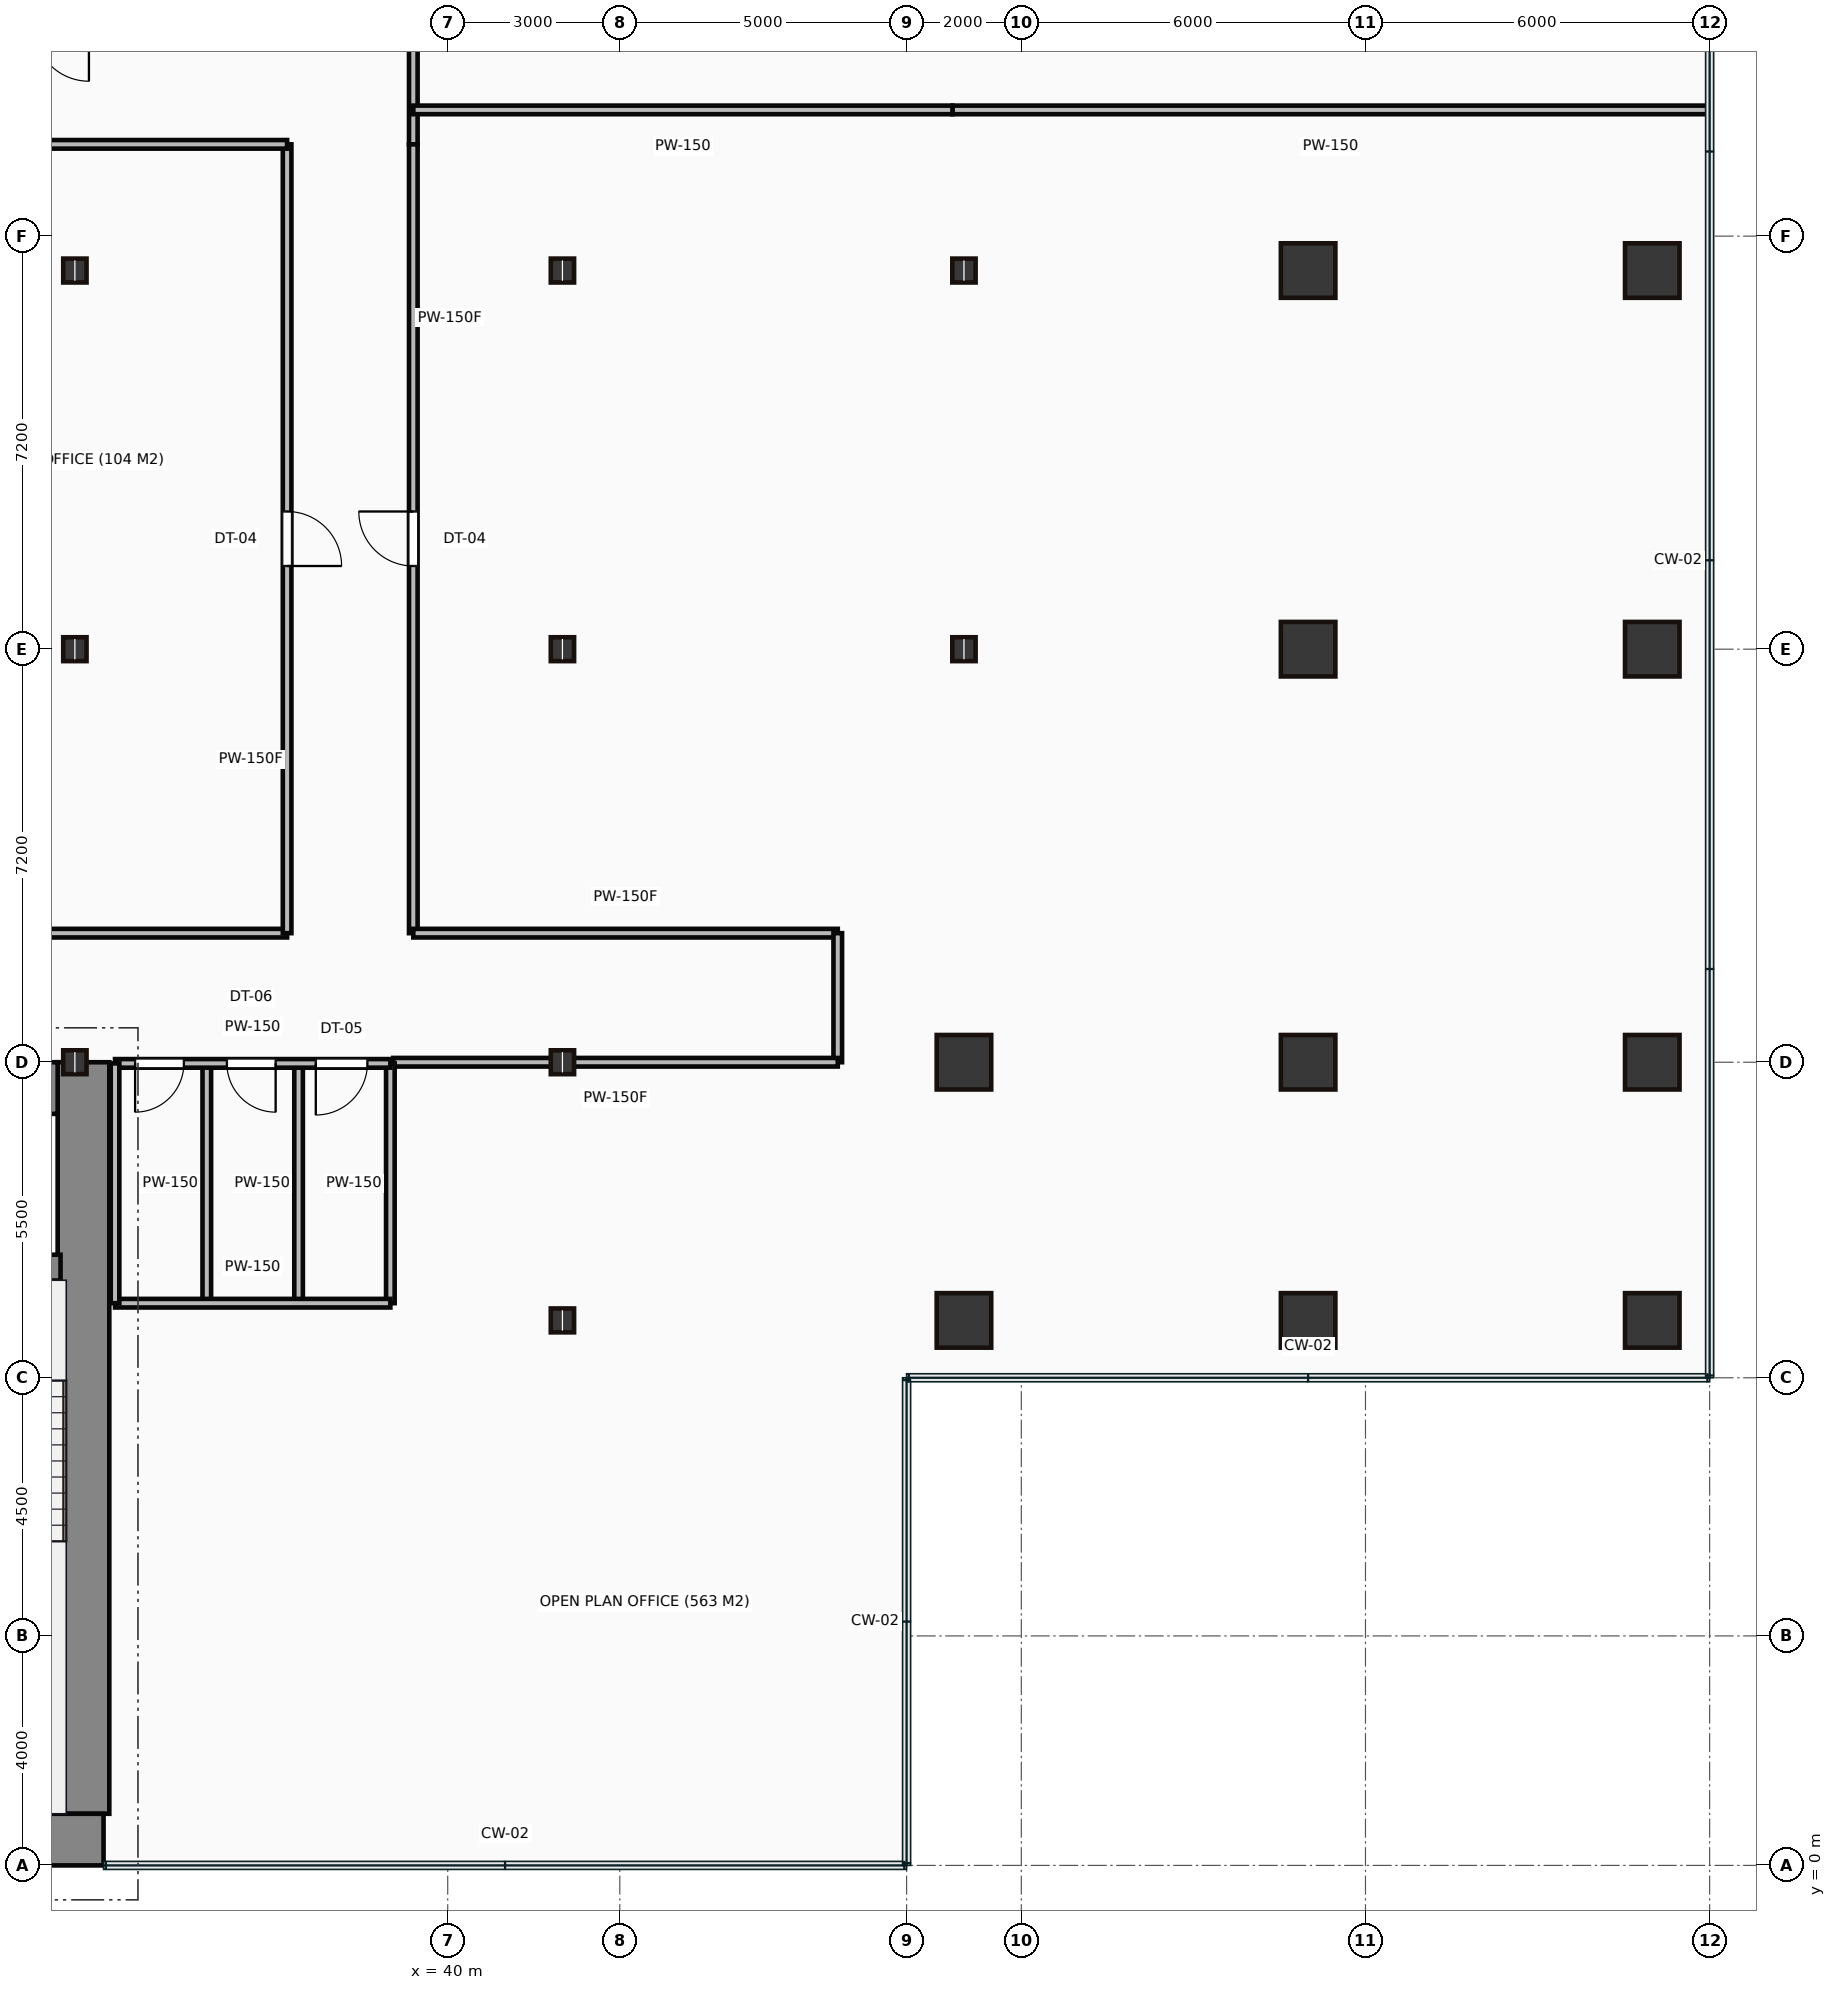
"""IFC4 building model, lengths in metres.
Left out: names, types, materials, properties, quantities, classifications, styles, units other than length and angle.
Written with IfcOpenShell. Run it as: python <this file> out.ifc"""

import sys

from ifc_helpers import new_model, si_unit, direction, frame, frame_2d, origin, origin_2d, place, context, subcontext, project, spatial, rectangle, hollow_rectangle, i_section, extrude, source, transform, mapped, element, fill, save


model = new_model("IFC4")
c1 = context("Model", 3, precision=1e-05, world=origin(), true_north=direction((0.0, 1.0)))
c2 = subcontext(c1, "Body", "Model", "MODEL_VIEW")
j1 = project(units=[si_unit("LENGTHUNIT", "METRE"), si_unit("PLANEANGLEUNIT", "RADIAN")], contexts=[c1])
p1 = place(None, origin())
s1 = spatial("IfcSite", under=j1, at=p1, CompositionType="ELEMENT")
p2 = place(p1, origin())
s2 = spatial("IfcBuilding", under=s1, at=p2, CompositionType="ELEMENT")
p3 = place(p2, frame((0.0, 0.0, 65.35)))
s3 = spatial("IfcBuildingStorey", under=s2, at=p3, CompositionType="ELEMENT", Elevation=65.35)
m1 = source(origin(), c2, "Body", "SweptSolid", [
    extrude(rectangle(XDim=29.5, YDim=0.9, at=frame_2d((14.75, 0.0))), origin(), (0.0, 0.0, 1.0), 3.65),
])
p4 = place(p3, frame((4.5, 0.45, 0.0), z_axis=(0.0, 0.0, 1.0), x_axis=(1.0, 0.0, 0.0)))
e1 = element("IfcWall", 1, at=p4, inside=s3, PredefinedType="SHEAR", context=c2, shape_type="MappedRepresentation", body=[
    mapped(m1, transform((0.0, 0.0, 0.0))),
])
m2 = source(origin(), c2, "Body", "SweptSolid", [
    extrude(rectangle(XDim=13.1, YDim=0.9, at=frame_2d((6.55, 0.0))), origin(), (0.0, 0.0, 1.0), 3.65),
])
p5 = place(p3, frame((33.65, 0.9, 0.0), z_axis=(0.0, 0.0, 1.0), x_axis=(0.0, 1.0, 0.0)))
e2 = element("IfcWall", 2, at=p5, inside=s3, PredefinedType="SHEAR", context=c2, shape_type="MappedRepresentation", body=[
    mapped(m2, transform((0.0, 0.0, 0.0))),
])
m3 = source(origin(), c2, "Body", "SweptSolid", [
    extrude(rectangle(XDim=12.6, YDim=0.9, at=frame_2d((6.3, 0.0))), origin(), (0.0, 0.0, 1.0), 3.65),
])
p6 = place(p3, frame((20.6, 13.55, 0.0), z_axis=(0.0, 0.0, 1.0), x_axis=(1.0, 0.0, 0.0)))
e3 = element("IfcWall", 3, at=p6, inside=s3, PredefinedType="SHEAR", context=c2, shape_type="MappedRepresentation", body=[
    mapped(m3, transform((0.0, 0.0, 0.0))),
])
p7 = place(p6, frame((9.25, 0.0, 0.0)))
e4 = element("IfcOpeningElement", 4, at=p7, cuts=e3, PredefinedType="OPENING", context=c2, shape_type="SweptSolid", body=[
    extrude(rectangle(XDim=1.1, YDim=2.15, at=frame_2d((0.55, 1.075))), frame((0.0, 0.46, 0.0), z_axis=(0.0, -1.0, 0.0), x_axis=(1.0, 0.0, 0.0)), (0.0, 0.0, 1.0), 0.92),
])
m4 = source(origin(), c2, "Body", "SweptSolid", [
    extrude(rectangle(XDim=3.39, YDim=0.45, at=frame_2d((1.695, 0.0))), origin(), (0.0, 0.0, 1.0), 3.65),
])
p8 = place(p3, frame((29.86, 10.42, 0.0), z_axis=(0.0, 0.0, 1.0), x_axis=(1.0, 0.0, 0.0)))
e5 = element("IfcWall", 5, at=p8, inside=s3, PredefinedType="SHEAR", context=c2, shape_type="MappedRepresentation", body=[
    mapped(m4, transform((0.0, 0.0, 0.0))),
])
p9 = place(p8, frame((1.1, 0.0, 0.0)))
e6 = element("IfcOpeningElement", 6, at=p9, cuts=e5, PredefinedType="OPENING", context=c2, shape_type="SweptSolid", body=[
    extrude(rectangle(XDim=1.1, YDim=2.15, at=frame_2d((0.55, 1.075))), frame((0.0, 0.235, 0.0), z_axis=(0.0, -1.0, 0.0), x_axis=(1.0, 0.0, 0.0)), (0.0, 0.0, 1.0), 0.47),
])
m5 = source(origin(), c2, "Body", "SweptSolid", [
    extrude(i_section(OverallWidth=0.406, OverallDepth=0.416, WebThickness=0.03, FlangeThickness=0.048, at=origin_2d()), origin(), (0.0, 0.0, 1.0), 3.65),
])
for number, where, z_axis, x_axis in (
    (7, (33.5, 14.0, 0.0), (0.0, 0.0, 1.0), (1.0, 0.0, 0.0)),
    (8, (33.5, 21.2, 0.0), (0.0, 0.0, 1.0), (1.0, 0.0, 0.0)),
    (9, (33.5, 27.8, 0.0), (0.0, 0.0, 1.0), (1.0, 0.0, 0.0)),
    (10, (42.0, 9.5, 0.0), (0.0, 0.0, 1.0), (1.0, 0.0, 0.0)),
    (11, (42.0, 14.0, 0.0), (0.0, 0.0, 1.0), (1.0, 0.0, 0.0)),
    (12, (42.0, 21.2, 0.0), (0.0, 0.0, 1.0), (1.0, 0.0, 0.0)),
    (13, (42.0, 27.8, 0.0), (0.0, 0.0, 1.0), (1.0, 0.0, 0.0)),
):
    element("IfcColumn", number, at=place(p3, frame(where, z_axis=z_axis, x_axis=x_axis)), inside=s3, PredefinedType="COLUMN", context=c2, shape_type="MappedRepresentation", body=[
        mapped(m5, transform((0.0, 0.0, 0.0))),
    ])
m6 = source(origin(), c2, "Body", "SweptSolid", [
    extrude(hollow_rectangle(XDim=0.95, YDim=0.95, WallThickness=0.045, at=origin_2d()), origin(), (0.0, 0.0, 1.0), 3.65),
])
for number, where, z_axis, x_axis in (
    (14, (49.0, 9.5, 0.0), (0.0, 0.0, 1.0), (1.0, 0.0, 0.0)),
    (15, (49.0, 14.0, 0.0), (0.0, 0.0, 1.0), (1.0, 0.0, 0.0)),
):
    element("IfcColumn", number, at=place(p3, frame(where, z_axis=z_axis, x_axis=x_axis)), inside=s3, PredefinedType="COLUMN", context=c2, shape_type="MappedRepresentation", body=[
        mapped(m6, transform((0.0, 0.0, 0.0))),
    ])
for number, where, z_axis, x_axis in (
    (16, (49.0, 21.2, 0.0), (0.0, 0.0, 1.0), (1.0, 0.0, 0.0)),
    (17, (49.0, 27.8, 0.0), (0.0, 0.0, 1.0), (1.0, 0.0, 0.0)),
):
    element("IfcColumn", number, at=place(p3, frame(where, z_axis=z_axis, x_axis=x_axis)), inside=s3, PredefinedType="COLUMN", context=c2, shape_type="MappedRepresentation", body=[
        mapped(m5, transform((0.0, 0.0, 0.0))),
    ])
for number, where, z_axis, x_axis in (
    (18, (55.0, 9.5, 0.0), (0.0, 0.0, 1.0), (1.0, 0.0, 0.0)),
    (19, (55.0, 14.0, 0.0), (0.0, 0.0, 1.0), (1.0, 0.0, 0.0)),
    (20, (55.0, 21.2, 0.0), (0.0, 0.0, 1.0), (1.0, 0.0, 0.0)),
    (21, (55.0, 27.8, 0.0), (0.0, 0.0, 1.0), (1.0, 0.0, 0.0)),
    (22, (61.0, 9.5, 0.0), (0.0, 0.0, 1.0), (1.0, 0.0, 0.0)),
    (23, (61.0, 14.0, 0.0), (0.0, 0.0, 1.0), (1.0, 0.0, 0.0)),
    (24, (61.0, 21.2, 0.0), (0.0, 0.0, 1.0), (1.0, 0.0, 0.0)),
    (25, (61.0, 27.8, 0.0), (0.0, 0.0, 1.0), (1.0, 0.0, 0.0)),
):
    element("IfcColumn", number, at=place(p3, frame(where, z_axis=z_axis, x_axis=x_axis)), inside=s3, PredefinedType="COLUMN", context=c2, shape_type="MappedRepresentation", body=[
        mapped(m6, transform((0.0, 0.0, 0.0))),
    ])
m7 = source(origin(), c2, "Body", "SweptSolid", [
    extrude(rectangle(XDim=4.8, YDim=0.15, at=frame_2d((2.4, 0.0))), origin(), (0.0, 0.0, 1.0), 2.625),
])
p10 = place(p3, frame((34.2, 13.98, 0.0), z_axis=(0.0, 0.0, 1.0), x_axis=(1.0, 0.0, 0.0)))
e26 = element("IfcWall", 26, at=p10, inside=s3, PredefinedType="PARTITIONING", context=c2, shape_type="MappedRepresentation", body=[
    mapped(m7, transform((0.0, 0.0, 0.0))),
])
p11 = place(p10, frame((0.35, 0.0, 0.0)))
e27 = element("IfcOpeningElement", 27, at=p11, cuts=e26, PredefinedType="OPENING", context=c2, shape_type="SweptSolid", body=[
    extrude(rectangle(XDim=0.85, YDim=2.1, at=frame_2d((0.425, 1.05))), frame((0.0, 0.085, 0.0), z_axis=(0.0, -1.0, 0.0), x_axis=(1.0, 0.0, 0.0)), (0.0, 0.0, 1.0), 0.17),
])
p12 = place(p10, frame((1.95, 0.0, 0.0)))
e28 = element("IfcOpeningElement", 28, at=p12, cuts=e26, PredefinedType="OPENING", context=c2, shape_type="SweptSolid", body=[
    extrude(rectangle(XDim=0.85, YDim=2.1, at=frame_2d((0.425, 1.05))), frame((0.0, 0.085, 0.0), z_axis=(0.0, -1.0, 0.0), x_axis=(1.0, 0.0, 0.0)), (0.0, 0.0, 1.0), 0.17),
])
p13 = place(p10, frame((3.5, 0.0, 0.0)))
e29 = element("IfcOpeningElement", 29, at=p13, cuts=e26, PredefinedType="OPENING", context=c2, shape_type="SweptSolid", body=[
    extrude(rectangle(XDim=0.9, YDim=2.1, at=frame_2d((0.45, 1.05))), frame((0.0, 0.085, 0.0), z_axis=(0.0, -1.0, 0.0), x_axis=(1.0, 0.0, 0.0)), (0.0, 0.0, 1.0), 0.17),
])
m8 = source(origin(), c2, "Body", "SweptSolid", [
    extrude(rectangle(XDim=4.8, YDim=0.15, at=frame_2d((2.4, 0.0))), origin(), (0.0, 0.0, 1.0), 3.4),
])
p14 = place(p3, frame((34.2, 9.8, 0.0), z_axis=(0.0, 0.0, 1.0), x_axis=(1.0, 0.0, 0.0)))
e30 = element("IfcWall", 30, at=p14, inside=s3, PredefinedType="PARTITIONING", context=c2, shape_type="MappedRepresentation", body=[
    mapped(m8, transform((0.0, 0.0, 0.0))),
])
m9 = source(origin(), c2, "Body", "SweptSolid", [
    extrude(rectangle(XDim=4.18, YDim=0.15, at=frame_2d((2.09, 0.0))), origin(), (0.0, 0.0, 1.0), 3.4),
])
for number, where, z_axis, x_axis in (
    (31, (39.0, 9.8, 0.0), (0.0, 0.0, 1.0), (0.0, 1.0, 0.0)),
    (32, (34.2, 9.8, 0.0), (0.0, 0.0, 1.0), (0.0, 1.0, 0.0)),
    (33, (35.8, 9.8, 0.0), (0.0, 0.0, 1.0), (0.0, 1.0, 0.0)),
    (34, (37.4, 9.8, 0.0), (0.0, 0.0, 1.0), (0.0, 1.0, 0.0)),
):
    element("IfcWall", number, at=place(p3, frame(where, z_axis=z_axis, x_axis=x_axis)), inside=s3, PredefinedType="PARTITIONING", context=c2, shape_type="MappedRepresentation", body=[
        mapped(m9, transform((0.0, 0.0, 0.0))),
    ])
m10 = source(origin(), c2, "Body", "SweptSolid", [
    extrude(rectangle(XDim=2.05, YDim=0.15, at=frame_2d((1.025, 0.0))), origin(), (0.0, 0.0, 1.0), 3.4),
])
p15 = place(p3, frame((39.4, 32.05, 0.0), z_axis=(0.0, 0.0, 1.0), x_axis=(0.0, -1.0, 0.0)))
e35 = element("IfcWall", 35, at=p15, inside=s3, PredefinedType="PARTITIONING", context=c2, shape_type="MappedRepresentation", body=[
    mapped(m10, transform((0.0, 0.0, 0.0))),
])
m11 = source(origin(), c2, "Body", "SweptSolid", [
    extrude(rectangle(XDim=13.75, YDim=0.15, at=frame_2d((6.875, 0.0))), origin(), (0.0, 0.0, 1.0), 3.4),
])
p16 = place(p3, frame((39.4, 30.0, 0.0), z_axis=(0.0, 0.0, 1.0), x_axis=(0.0, -1.0, 0.0)))
e36 = element("IfcWall", 36, at=p16, inside=s3, PredefinedType="PARTITIONING", context=c2, shape_type="MappedRepresentation", body=[
    mapped(m11, transform((0.0, 0.0, 0.0))),
])
p17 = place(p16, frame((6.4, 0.0, 0.0)))
e37 = element("IfcOpeningElement", 37, at=p17, cuts=e36, PredefinedType="OPENING", context=c2, shape_type="SweptSolid", body=[
    extrude(rectangle(XDim=0.95, YDim=2.15, at=frame_2d((0.475, 1.075))), frame((0.0, 0.085, 0.0), z_axis=(0.0, -1.0, 0.0), x_axis=(1.0, 0.0, 0.0)), (0.0, 0.0, 1.0), 0.17),
])
m12 = source(origin(), c2, "Body", "SweptSolid", [
    extrude(rectangle(XDim=7.4, YDim=0.15, at=frame_2d((3.7, 0.0))), origin(), (0.0, 0.0, 1.0), 3.4),
])
p18 = place(p3, frame((39.4, 16.25, 0.0), z_axis=(0.0, 0.0, 1.0), x_axis=(1.0, 0.0, 0.0)))
e38 = element("IfcWall", 38, at=p18, inside=s3, PredefinedType="PARTITIONING", context=c2, shape_type="MappedRepresentation", body=[
    mapped(m12, transform((0.0, 0.0, 0.0))),
])
m13 = source(origin(), c2, "Body", "SweptSolid", [
    extrude(rectangle(XDim=2.25, YDim=0.15, at=frame_2d((1.125, 0.0))), origin(), (0.0, 0.0, 1.0), 3.4),
])
p19 = place(p3, frame((46.8, 16.25, 0.0), z_axis=(0.0, 0.0, 1.0), x_axis=(0.0, -1.0, 0.0)))
e39 = element("IfcWall", 39, at=p19, inside=s3, PredefinedType="PARTITIONING", context=c2, shape_type="MappedRepresentation", body=[
    mapped(m13, transform((0.0, 0.0, 0.0))),
])
m14 = source(origin(), c2, "Body", "SweptSolid", [
    extrude(rectangle(XDim=7.75, YDim=0.15, at=frame_2d((3.875, 0.0))), origin(), (0.0, 0.0, 1.0), 2.625),
])
p20 = place(p3, frame((46.8, 14.0, 0.0), z_axis=(0.0, 0.0, 1.0), x_axis=(-1.0, 0.0, 0.0)))
e40 = element("IfcWall", 40, at=p20, inside=s3, PredefinedType="PARTITIONING", context=c2, shape_type="MappedRepresentation", body=[
    mapped(m14, transform((0.0, 0.0, 0.0))),
])
m15 = source(origin(), c2, "Body", "SweptSolid", [
    extrude(rectangle(XDim=31.6, YDim=0.15, at=frame_2d((15.8, 0.0))), origin(), (0.0, 0.0, 1.0), 3.4),
])
p21 = place(p3, frame((5.6, 16.25, 0.0), z_axis=(0.0, 0.0, 1.0), x_axis=(1.0, 0.0, 0.0)))
e41 = element("IfcWall", 41, at=p21, inside=s3, PredefinedType="PARTITIONING", context=c2, shape_type="MappedRepresentation", body=[
    mapped(m15, transform((0.0, 0.0, 0.0))),
])
p22 = place(p21, frame((10.125, 0.0, 0.0)))
e42 = element("IfcOpeningElement", 42, at=p22, cuts=e41, PredefinedType="OPENING", context=c2, shape_type="SweptSolid", body=[
    extrude(rectangle(XDim=0.95, YDim=2.15, at=frame_2d((0.475, 1.075))), frame((0.0, 0.085, 0.0), z_axis=(0.0, -1.0, 0.0), x_axis=(1.0, 0.0, 0.0)), (0.0, 0.0, 1.0), 0.17),
])
p23 = place(p21, frame((18.925, 0.0, 0.0)))
e43 = element("IfcOpeningElement", 43, at=p23, cuts=e41, PredefinedType="OPENING", context=c2, shape_type="SweptSolid", body=[
    extrude(rectangle(XDim=0.95, YDim=2.15, at=frame_2d((0.475, 1.075))), frame((0.0, 0.085, 0.0), z_axis=(0.0, -1.0, 0.0), x_axis=(1.0, 0.0, 0.0)), (0.0, 0.0, 1.0), 0.17),
])
p24 = place(p3, frame((37.2, 16.25, 0.0), z_axis=(0.0, 0.0, 1.0), x_axis=(0.0, 1.0, 0.0)))
e44 = element("IfcWall", 44, at=p24, inside=s3, PredefinedType="PARTITIONING", context=c2, shape_type="MappedRepresentation", body=[
    mapped(m11, transform((0.0, 0.0, 0.0))),
])
p25 = place(p24, frame((6.4, 0.0, 0.0)))
e45 = element("IfcOpeningElement", 45, at=p25, cuts=e44, PredefinedType="OPENING", context=c2, shape_type="SweptSolid", body=[
    extrude(rectangle(XDim=0.95, YDim=2.15, at=frame_2d((0.475, 1.075))), frame((0.0, 0.085, 0.0), z_axis=(0.0, -1.0, 0.0), x_axis=(1.0, 0.0, 0.0)), (0.0, 0.0, 1.0), 0.17),
])
m16 = source(origin(), c2, "Body", "SweptSolid", [
    extrude(rectangle(XDim=31.6, YDim=0.15, at=frame_2d((15.8, 0.0))), origin(), (0.0, 0.0, 1.0), 2.978),
])
p26 = place(p3, frame((37.2, 30.0, 0.0), z_axis=(0.0, 0.0, 1.0), x_axis=(-1.0, 0.0, 0.0)))
e46 = element("IfcWall", 46, at=p26, inside=s3, PredefinedType="PARTITIONING", context=c2, shape_type="MappedRepresentation", body=[
    mapped(m16, transform((0.0, 0.0, 0.0))),
])
m17 = source(origin(), c2, "Body", "SweptSolid", [
    extrude(rectangle(XDim=13.18, YDim=0.15, at=frame_2d((6.59, 0.0))), origin(), (0.0, 0.0, 1.0), 3.4),
])
p27 = place(p3, frame((61.98, 30.6, 0.0), z_axis=(0.0, 0.0, 1.0), x_axis=(-1.0, 0.0, 0.0)))
e47 = element("IfcWall", 47, at=p27, inside=s3, PredefinedType="PARTITIONING", context=c2, shape_type="MappedRepresentation", body=[
    mapped(m17, transform((0.0, 0.0, 0.0))),
])
m18 = source(origin(), c2, "Body", "SweptSolid", [
    extrude(rectangle(XDim=9.4, YDim=0.15, at=frame_2d((4.7, 0.0))), origin(), (0.0, 0.0, 1.0), 3.4),
])
p28 = place(p3, frame((48.8, 30.6, 0.0), z_axis=(0.0, 0.0, 1.0), x_axis=(-1.0, 0.0, 0.0)))
e48 = element("IfcWall", 48, at=p28, inside=s3, PredefinedType="PARTITIONING", context=c2, shape_type="MappedRepresentation", body=[
    mapped(m18, transform((0.0, 0.0, 0.0))),
])
m19 = source(origin(), c2, "Body", "SweptSolid", [
    extrude(rectangle(XDim=0.85, YDim=2.1, at=frame_2d((0.425, 1.05))), frame((0.0, 0.025, 0.0), z_axis=(0.0, -1.0, 0.0), x_axis=(1.0, 0.0, 0.0)), (0.0, 0.0, 1.0), 0.05),
])
p29 = place(p11, frame((0.85, 0.0, 0.0), z_axis=(0.0, 0.0, 1.0), x_axis=(-1.0, 0.0, 0.0)))
e49 = element("IfcDoor", 49, at=p29, inside=s3, OperationType="SINGLE_SWING_LEFT", PredefinedType="DOOR", context=c2, shape_type="MappedRepresentation", body=[
    mapped(m19, transform((0.0, 0.0, 0.0))),
])
fill(e27, e49)
p30 = place(p12, frame((0.85, 0.0, 0.0), z_axis=(0.0, 0.0, 1.0), x_axis=(-1.0, 0.0, 0.0)))
e50 = element("IfcDoor", 50, at=p30, inside=s3, OperationType="SINGLE_SWING_RIGHT", PredefinedType="DOOR", context=c2, shape_type="MappedRepresentation", body=[
    mapped(m19, transform((0.0, 0.0, 0.0))),
])
fill(e28, e50)
m20 = source(origin(), c2, "Body", "SweptSolid", [
    extrude(rectangle(XDim=0.9, YDim=2.1, at=frame_2d((0.45, 1.05))), frame((0.0, 0.025, 0.0), z_axis=(0.0, -1.0, 0.0), x_axis=(1.0, 0.0, 0.0)), (0.0, 0.0, 1.0), 0.05),
])
p31 = place(p13, frame((0.9, 0.0, 0.0), z_axis=(0.0, 0.0, 1.0), x_axis=(-1.0, 0.0, 0.0)))
e51 = element("IfcDoor", 51, at=p31, inside=s3, OperationType="SINGLE_SWING_LEFT", PredefinedType="DOOR", context=c2, shape_type="MappedRepresentation", body=[
    mapped(m20, transform((0.0, 0.0, 0.0))),
])
fill(e29, e51)
m21 = source(origin(), c2, "Body", "SweptSolid", [
    extrude(rectangle(XDim=0.95, YDim=2.15, at=frame_2d((0.475, 1.075))), frame((0.0, 0.025, 0.0), z_axis=(0.0, -1.0, 0.0), x_axis=(1.0, 0.0, 0.0)), (0.0, 0.0, 1.0), 0.05),
])
p32 = place(p25, origin())
e52 = element("IfcDoor", 52, at=p32, inside=s3, OperationType="SINGLE_SWING_LEFT", PredefinedType="DOOR", context=c2, shape_type="MappedRepresentation", body=[
    mapped(m21, transform((0.0, 0.0, 0.0))),
])
fill(e45, e52)
p33 = place(p17, origin())
e53 = element("IfcDoor", 53, at=p33, inside=s3, OperationType="SINGLE_SWING_LEFT", PredefinedType="DOOR", context=c2, shape_type="MappedRepresentation", body=[
    mapped(m21, transform((0.0, 0.0, 0.0))),
])
fill(e37, e53)
save(model, sys.argv[1])
